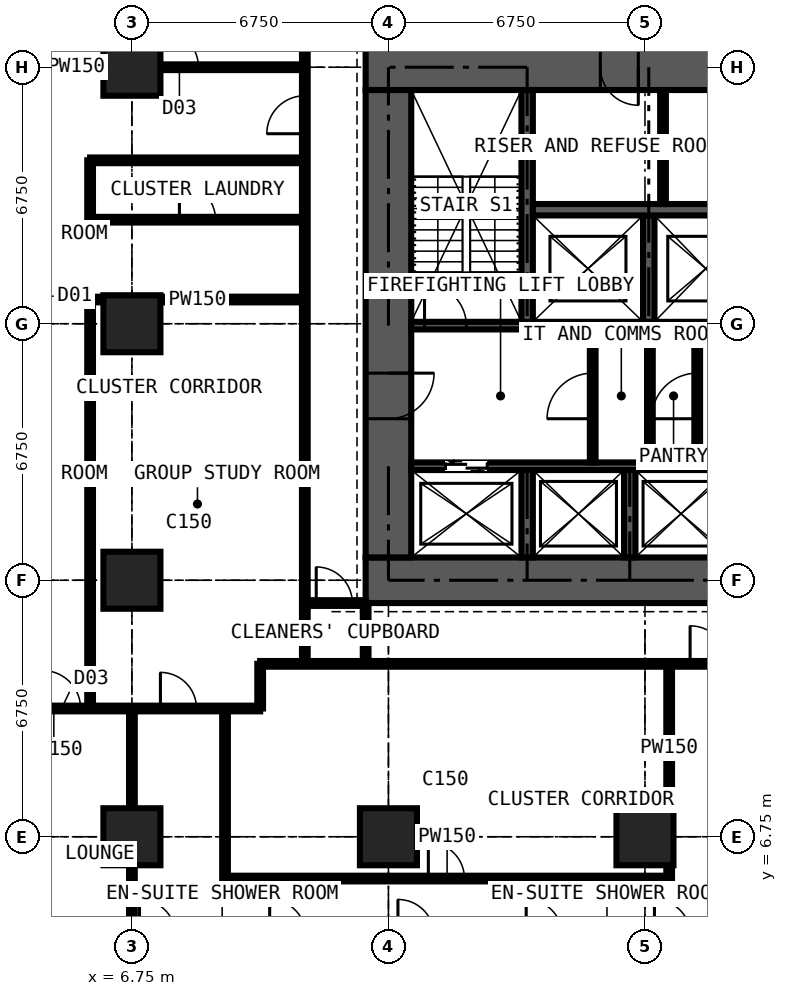
"""IFC4 building model, lengths in metres.
Left out: names, types, materials, properties, quantities, classifications, styles, units other than length and angle.
Written with IfcOpenShell. Run it as: python <this file> out.ifc"""

import sys

from ifc_helpers import new_model, si_unit, direction, frame, frame_2d, origin, origin_2d, place, context, subcontext, project, spatial, rectangle, extrude, element, fill, save


model = new_model("IFC4")
c1 = context("Model", 3, precision=1e-05, world=origin(), true_north=direction((0.0, 1.0)))
c2 = subcontext(c1, "Body", "Model", "MODEL_VIEW")
j1 = project(units=[si_unit("LENGTHUNIT", "METRE"), si_unit("PLANEANGLEUNIT", "RADIAN")], contexts=[c1])
p1 = place(None, origin())
s1 = spatial("IfcSite", under=j1, at=p1, CompositionType="ELEMENT")
p2 = place(p1, origin())
s2 = spatial("IfcBuilding", under=s1, at=p2, CompositionType="ELEMENT")
p3 = place(p2, frame((0.0, 0.0, 108.9)))
s3 = spatial("IfcBuildingStorey", under=s2, at=p3, CompositionType="ELEMENT", Elevation=108.9)
for number, where, z_axis, x_axis in (
    (1, (6.75, 6.75, 0.0), (0.0, 0.0, 1.0), (1.0, 0.0, 0.0)),
    (2, (6.75, 13.5, 0.0), (0.0, 0.0, 1.0), (1.0, 0.0, 0.0)),
    (3, (6.75, 20.25, 0.0), (0.0, 0.0, 1.0), (1.0, 0.0, 0.0)),
    (4, (6.75, 27.0, 0.0), (0.0, 0.0, 1.0), (1.0, 0.0, 0.0)),
    (5, (13.5, 6.75, 0.0), (0.0, 0.0, 1.0), (1.0, 0.0, 0.0)),
    (6, (20.25, 6.75, 0.0), (0.0, 0.0, 1.0), (1.0, 0.0, 0.0)),
):
    element("IfcColumn", number, at=place(p3, frame(where, z_axis=z_axis, x_axis=x_axis)), inside=s3, PredefinedType="COLUMN", context=c2, shape_type="SweptSolid", body=[
        extrude(rectangle(XDim=1.5, YDim=1.5, at=origin_2d()), origin(), (0.0, 0.0, 1.0), 3.6),
    ])
p4 = place(p3, frame((12.9, 13.5, 0.0), z_axis=(0.0, 0.0, 1.0), x_axis=(1.0, 0.0, 0.0)))
e7 = element("IfcWall", 7, at=p4, inside=s3, PredefinedType="SHEAR", context=c2, shape_type="SweptSolid", body=[
    extrude(rectangle(XDim=14.7, YDim=1.2, at=frame_2d((7.35, 0.0))), origin(), (0.0, 0.0, 1.0), 3.6),
])
p5 = place(p3, frame((27.6, 27.0, 0.0), z_axis=(0.0, 0.0, 1.0), x_axis=(-1.0, 0.0, 0.0)))
e8 = element("IfcWall", 8, at=p5, inside=s3, PredefinedType="SHEAR", context=c2, shape_type="SweptSolid", body=[
    extrude(rectangle(XDim=14.7, YDim=1.2, at=frame_2d((7.35, 0.0))), origin(), (0.0, 0.0, 1.0), 3.6),
])
p6 = place(p5, frame((4.55, 0.0, 0.0)))
e9 = element("IfcOpeningElement", 9, at=p6, cuts=e8, PredefinedType="OPENING", context=c2, shape_type="SweptSolid", body=[
    extrude(rectangle(XDim=0.9, YDim=2.2, at=frame_2d((0.45, 1.1))), frame((0.0, 0.61, 0.0), z_axis=(0.0, -1.0, 0.0), x_axis=(1.0, 0.0, 0.0)), (0.0, 0.0, 1.0), 1.22),
])
p7 = place(p5, frame((7.525, 0.0, 0.0)))
e10 = element("IfcOpeningElement", 10, at=p7, cuts=e8, PredefinedType="OPENING", context=c2, shape_type="SweptSolid", body=[
    extrude(rectangle(XDim=1.0, YDim=2.2, at=frame_2d((0.5, 1.1))), frame((0.0, 0.61, 0.0), z_axis=(0.0, -1.0, 0.0), x_axis=(1.0, 0.0, 0.0)), (0.0, 0.0, 1.0), 1.22),
])
p8 = place(p3, frame((13.5, 26.4, 0.0), z_axis=(0.0, 0.0, 1.0), x_axis=(0.0, -1.0, 0.0)))
e11 = element("IfcWall", 11, at=p8, inside=s3, PredefinedType="SHEAR", context=c2, shape_type="SweptSolid", body=[
    extrude(rectangle(XDim=12.3, YDim=1.2, at=frame_2d((6.15, 0.0))), origin(), (0.0, 0.0, 1.0), 3.6),
])
p9 = place(p8, frame((7.45, 0.0, 0.0)))
e12 = element("IfcOpeningElement", 12, at=p9, cuts=e11, PredefinedType="OPENING", context=c2, shape_type="SweptSolid", body=[
    extrude(rectangle(XDim=1.2, YDim=2.2, at=frame_2d((0.6, 1.1))), frame((0.0, 0.61, 0.0), z_axis=(0.0, -1.0, 0.0), x_axis=(1.0, 0.0, 0.0)), (0.0, 0.0, 1.0), 1.22),
])
p10 = place(p3, frame((14.1, 16.5, 0.0), z_axis=(0.0, 0.0, 1.0), x_axis=(1.0, 0.0, 0.0)))
e13 = element("IfcWall", 13, at=p10, inside=s3, PredefinedType="SHEAR", context=c2, shape_type="SweptSolid", body=[
    extrude(rectangle(XDim=12.3, YDim=0.2, at=frame_2d((6.15, 0.0))), origin(), (0.0, 0.0, 1.0), 3.6),
])
p11 = place(p10, frame((0.9, 0.0, 0.0)))
e14 = element("IfcOpeningElement", 14, at=p11, cuts=e13, PredefinedType="OPENING", context=c2, shape_type="SweptSolid", body=[
    extrude(rectangle(XDim=1.1, YDim=2.2, at=frame_2d((0.55, 1.1))), frame((0.0, 0.11, 0.0), z_axis=(0.0, -1.0, 0.0), x_axis=(1.0, 0.0, 0.0)), (0.0, 0.0, 1.0), 0.22),
])
p12 = place(p10, frame((9.5, 0.0, 0.0)))
e15 = element("IfcOpeningElement", 15, at=p12, cuts=e13, PredefinedType="OPENING", context=c2, shape_type="SweptSolid", body=[
    extrude(rectangle(XDim=1.1, YDim=2.2, at=frame_2d((0.55, 1.1))), frame((0.0, 0.11, 0.0), z_axis=(0.0, -1.0, 0.0), x_axis=(1.0, 0.0, 0.0)), (0.0, 0.0, 1.0), 0.22),
])
p13 = place(p3, frame((14.1, 20.2, 0.0), z_axis=(0.0, 0.0, 1.0), x_axis=(1.0, 0.0, 0.0)))
e16 = element("IfcWall", 16, at=p13, inside=s3, PredefinedType="SHEAR", context=c2, shape_type="SweptSolid", body=[
    extrude(rectangle(XDim=12.3, YDim=0.2, at=frame_2d((6.15, 0.0))), origin(), (0.0, 0.0, 1.0), 3.6),
])
p14 = place(p13, frame((0.35, 0.0, 0.0)))
e17 = element("IfcOpeningElement", 17, at=p14, cuts=e16, PredefinedType="OPENING", context=c2, shape_type="SweptSolid", body=[
    extrude(rectangle(XDim=1.1, YDim=2.2, at=frame_2d((0.55, 1.1))), frame((0.0, 0.11, 0.0), z_axis=(0.0, -1.0, 0.0), x_axis=(1.0, 0.0, 0.0)), (0.0, 0.0, 1.0), 0.22),
])
p15 = place(p13, frame((9.75, 0.0, 0.0)))
e18 = element("IfcOpeningElement", 18, at=p15, cuts=e16, PredefinedType="OPENING", context=c2, shape_type="SweptSolid", body=[
    extrude(rectangle(XDim=1.1, YDim=2.2, at=frame_2d((0.55, 1.1))), frame((0.0, 0.11, 0.0), z_axis=(0.0, -1.0, 0.0), x_axis=(1.0, 0.0, 0.0)), (0.0, 0.0, 1.0), 0.22),
])
p16 = place(p3, frame((17.15, 20.3, 0.0), z_axis=(0.0, 0.0, 1.0), x_axis=(0.0, 1.0, 0.0)))
e19 = element("IfcWall", 19, at=p16, inside=s3, PredefinedType="SHEAR", context=c2, shape_type="SweptSolid", body=[
    extrude(rectangle(XDim=6.1, YDim=0.3, at=frame_2d((3.05, 0.0))), origin(), (0.0, 0.0, 1.0), 3.6),
])
p17 = place(p3, frame((20.35, 20.3, 0.0), z_axis=(0.0, 0.0, 1.0), x_axis=(0.0, 1.0, 0.0)))
e20 = element("IfcWall", 20, at=p17, inside=s3, PredefinedType="SHEAR", context=c2, shape_type="SweptSolid", body=[
    extrude(rectangle(XDim=2.8, YDim=0.3, at=frame_2d((1.4, 0.0))), origin(), (0.0, 0.0, 1.0), 3.6),
])
p18 = place(p3, frame((17.3, 23.25, 0.0), z_axis=(0.0, 0.0, 1.0), x_axis=(1.0, 0.0, 0.0)))
e21 = element("IfcWall", 21, at=p18, inside=s3, PredefinedType="SHEAR", context=c2, shape_type="SweptSolid", body=[
    extrude(rectangle(XDim=5.9, YDim=0.3, at=frame_2d((2.95, 0.0))), origin(), (0.0, 0.0, 1.0), 3.6),
])
for number, where, z_axis, x_axis in (
    (22, (17.15, 14.1, 0.0), (0.0, 0.0, 1.0), (0.0, 1.0, 0.0)),
    (23, (19.85, 14.1, 0.0), (0.0, 0.0, 1.0), (0.0, 1.0, 0.0)),
):
    element("IfcWall", number, at=place(p3, frame(where, z_axis=z_axis, x_axis=x_axis)), inside=s3, PredefinedType="SHEAR", context=c2, shape_type="SweptSolid", body=[
        extrude(rectangle(XDim=2.3, YDim=0.3, at=frame_2d((1.15, 0.0))), origin(), (0.0, 0.0, 1.0), 3.6),
    ])
p19 = place(p3, frame((18.875, 16.6, 0.0), z_axis=(0.0, 0.0, 1.0), x_axis=(0.0, 1.0, 0.0)))
e24 = element("IfcWall", 24, at=p19, inside=s3, PredefinedType="PARTITIONING", context=c2, shape_type="SweptSolid", body=[
    extrude(rectangle(XDim=3.5, YDim=0.15, at=frame_2d((1.75, 0.0))), origin(), (0.0, 0.0, 1.0), 3.375),
])
p20 = place(p19, frame((1.15, 0.0, 0.0)))
e25 = element("IfcOpeningElement", 25, at=p20, cuts=e24, PredefinedType="OPENING", context=c2, shape_type="SweptSolid", body=[
    extrude(rectangle(XDim=1.2, YDim=2.2, at=frame_2d((0.6, 1.1))), frame((0.0, 0.085, 0.0), z_axis=(0.0, -1.0, 0.0), x_axis=(1.0, 0.0, 0.0)), (0.0, 0.0, 1.0), 0.17),
])
p21 = place(p3, frame((21.625, 16.6, 0.0), z_axis=(0.0, 0.0, 1.0), x_axis=(0.0, 1.0, 0.0)))
e26 = element("IfcWall", 26, at=p21, inside=s3, PredefinedType="PARTITIONING", context=c2, shape_type="SweptSolid", body=[
    extrude(rectangle(XDim=3.5, YDim=0.15, at=frame_2d((1.75, 0.0))), origin(), (0.0, 0.0, 1.0), 3.375),
])
p22 = place(p21, frame((1.15, 0.0, 0.0)))
e27 = element("IfcOpeningElement", 27, at=p22, cuts=e26, PredefinedType="OPENING", context=c2, shape_type="SweptSolid", body=[
    extrude(rectangle(XDim=1.2, YDim=2.2, at=frame_2d((0.6, 1.1))), frame((0.0, 0.085, 0.0), z_axis=(0.0, -1.0, 0.0), x_axis=(1.0, 0.0, 0.0)), (0.0, 0.0, 1.0), 0.17),
])
p23 = place(p3, frame((20.38, 16.6, 0.0), z_axis=(0.0, 0.0, 1.0), x_axis=(0.0, 1.0, 0.0)))
e28 = element("IfcWall", 28, at=p23, inside=s3, PredefinedType="PARTITIONING", context=c2, shape_type="SweptSolid", body=[
    extrude(rectangle(XDim=3.5, YDim=0.15, at=frame_2d((1.75, 0.0))), origin(), (0.0, 0.0, 1.0), 3.375),
])
p24 = place(p3, frame((20.725, 23.4, 0.0), z_axis=(0.0, 0.0, 1.0), x_axis=(0.0, 1.0, 0.0)))
e29 = element("IfcWall", 29, at=p24, inside=s3, PredefinedType="PARTITIONING", context=c2, shape_type="SweptSolid", body=[
    extrude(rectangle(XDim=3.0, YDim=0.15, at=frame_2d((1.5, 0.0))), origin(), (0.0, 0.0, 1.0), 3.375),
])
p25 = place(p3, frame((-0.734, 10.125, 0.0), z_axis=(0.0, 0.0, 1.0), x_axis=(1.0, 0.0, 0.0)))
e30 = element("IfcWall", 30, at=p25, inside=s3, PredefinedType="PARTITIONING", context=c2, shape_type="SweptSolid", body=[
    extrude(rectangle(XDim=10.859, YDim=0.15, at=frame_2d((5.429, 0.0))), origin(), (0.0, 0.0, 1.0), 3.375),
])
p26 = place(p25, frame((5.134, 0.0, 0.0)))
e31 = element("IfcOpeningElement", 31, at=p26, cuts=e30, PredefinedType="OPENING", context=c2, shape_type="SweptSolid", body=[
    extrude(rectangle(XDim=1.0, YDim=2.2, at=frame_2d((0.5, 1.1))), frame((0.0, 0.085, 0.0), z_axis=(0.0, -1.0, 0.0), x_axis=(1.0, 0.0, 0.0)), (0.0, 0.0, 1.0), 0.17),
])
p27 = place(p25, frame((8.234, 0.0, 0.0)))
e32 = element("IfcOpeningElement", 32, at=p27, cuts=e30, PredefinedType="OPENING", context=c2, shape_type="SweptSolid", body=[
    extrude(rectangle(XDim=0.95, YDim=2.2, at=frame_2d((0.475, 1.1))), frame((0.0, 0.085, 0.0), z_axis=(0.0, -1.0, 0.0), x_axis=(1.0, 0.0, 0.0)), (0.0, 0.0, 1.0), 0.17),
])
p28 = place(p3, frame((-0.734, 27.0, 0.0), z_axis=(0.0, 0.0, 1.0), x_axis=(1.0, 0.0, 0.0)))
e33 = element("IfcWall", 33, at=p28, inside=s3, PredefinedType="PARTITIONING", context=c2, shape_type="SweptSolid", body=[
    extrude(rectangle(XDim=12.034, YDim=0.15, at=frame_2d((6.017, 0.0))), origin(), (0.0, 0.0, 1.0), 2.806),
])
p29 = place(p28, frame((8.234, 0.0, 0.0)))
e34 = element("IfcOpeningElement", 34, at=p29, cuts=e33, PredefinedType="OPENING", context=c2, shape_type="SweptSolid", body=[
    extrude(rectangle(XDim=1.0, YDim=2.2, at=frame_2d((0.5, 1.1))), frame((0.0, 0.085, 0.0), z_axis=(0.0, -1.0, 0.0), x_axis=(1.0, 0.0, 0.0)), (0.0, 0.0, 1.0), 0.17),
])
p30 = place(p3, frame((5.65, 10.125, 0.0), z_axis=(0.0, 0.0, 1.0), x_axis=(0.0, 1.0, 0.0)))
e35 = element("IfcWall", 35, at=p30, inside=s3, PredefinedType="PARTITIONING", context=c2, shape_type="SweptSolid", body=[
    extrude(rectangle(XDim=10.762, YDim=0.15, at=frame_2d((5.381, 0.0))), origin(), (0.0, 0.0, 1.0), 3.375),
])
p31 = place(p3, frame((5.65, 20.887, 0.0), z_axis=(0.0, 0.0, 1.0), x_axis=(1.0, 0.0, 0.0)))
e36 = element("IfcWall", 36, at=p31, inside=s3, PredefinedType="PARTITIONING", context=c2, shape_type="SweptSolid", body=[
    extrude(rectangle(XDim=5.65, YDim=0.15, at=frame_2d((2.825, 0.0))), origin(), (0.0, 0.0, 1.0), 3.375),
])
p32 = place(p3, frame((5.65, 22.988, 0.0), z_axis=(0.0, 0.0, 1.0), x_axis=(0.0, 1.0, 0.0)))
e37 = element("IfcWall", 37, at=p32, inside=s3, PredefinedType="PARTITIONING", context=c2, shape_type="SweptSolid", body=[
    extrude(rectangle(XDim=1.562, YDim=0.15, at=frame_2d((0.781, 0.0))), origin(), (0.0, 0.0, 1.0), 3.375),
])
p33 = place(p3, frame((5.65, 22.988, 0.0), z_axis=(0.0, 0.0, 1.0), x_axis=(1.0, 0.0, 0.0)))
e38 = element("IfcWall", 38, at=p33, inside=s3, PredefinedType="PARTITIONING", context=c2, shape_type="SweptSolid", body=[
    extrude(rectangle(XDim=5.65, YDim=0.15, at=frame_2d((2.825, 0.0))), origin(), (0.0, 0.0, 1.0), 3.375),
])
p34 = place(p33, frame((2.35, 0.0, 0.0)))
e39 = element("IfcOpeningElement", 39, at=p34, cuts=e38, PredefinedType="OPENING", context=c2, shape_type="SweptSolid", body=[
    extrude(rectangle(XDim=0.95, YDim=2.2, at=frame_2d((0.475, 1.1))), frame((0.0, 0.085, 0.0), z_axis=(0.0, -1.0, 0.0), x_axis=(1.0, 0.0, 0.0)), (0.0, 0.0, 1.0), 0.17),
])
p35 = place(p3, frame((5.65, 24.55, 0.0), z_axis=(0.0, 0.0, 1.0), x_axis=(1.0, 0.0, 0.0)))
e40 = element("IfcWall", 40, at=p35, inside=s3, PredefinedType="PARTITIONING", context=c2, shape_type="SweptSolid", body=[
    extrude(rectangle(XDim=5.65, YDim=0.15, at=frame_2d((2.825, 0.0))), origin(), (0.0, 0.0, 1.0), 3.375),
])
p36 = place(p3, frame((6.75, -0.734, 0.0), z_axis=(0.0, 0.0, 1.0), x_axis=(0.0, 1.0, 0.0)))
e41 = element("IfcWall", 41, at=p36, inside=s3, PredefinedType="PARTITIONING", context=c2, shape_type="SweptSolid", body=[
    extrude(rectangle(XDim=10.859, YDim=0.15, at=frame_2d((5.429, 0.0))), origin(), (0.0, 0.0, 1.0), 2.877),
])
p37 = place(p3, frame((9.2, 5.65, 0.0), z_axis=(0.0, 0.0, 1.0), x_axis=(0.0, 1.0, 0.0)))
e42 = element("IfcWall", 42, at=p37, inside=s3, PredefinedType="PARTITIONING", context=c2, shape_type="SweptSolid", body=[
    extrude(rectangle(XDim=4.475, YDim=0.15, at=frame_2d((2.238, 0.0))), origin(), (0.0, 0.0, 1.0), 3.375),
])
p38 = place(p3, frame((9.2, 5.65, 0.0), z_axis=(0.0, 0.0, 1.0), x_axis=(1.0, 0.0, 0.0)))
e43 = element("IfcWall", 43, at=p38, inside=s3, PredefinedType="PARTITIONING", context=c2, shape_type="SweptSolid", body=[
    extrude(rectangle(XDim=11.688, YDim=0.15, at=frame_2d((5.844, 0.0))), origin(), (0.0, 0.0, 1.0), 3.375),
])
p39 = place(p38, frame((5.35, 0.0, 0.0)))
e44 = element("IfcOpeningElement", 44, at=p39, cuts=e43, PredefinedType="OPENING", context=c2, shape_type="SweptSolid", body=[
    extrude(rectangle(XDim=0.95, YDim=2.2, at=frame_2d((0.475, 1.1))), frame((0.0, 0.085, 0.0), z_axis=(0.0, -1.0, 0.0), x_axis=(1.0, 0.0, 0.0)), (0.0, 0.0, 1.0), 0.17),
])
p40 = place(p3, frame((10.125, 10.125, 0.0), z_axis=(0.0, 0.0, 1.0), x_axis=(0.0, 1.0, 0.0)))
e45 = element("IfcWall", 45, at=p40, inside=s3, PredefinedType="PARTITIONING", context=c2, shape_type="SweptSolid", body=[
    extrude(rectangle(XDim=1.175, YDim=0.15, at=frame_2d((0.587, 0.0))), origin(), (0.0, 0.0, 1.0), 3.375),
])
p41 = place(p3, frame((10.125, 11.3, 0.0), z_axis=(0.0, 0.0, 1.0), x_axis=(1.0, 0.0, 0.0)))
e46 = element("IfcWall", 46, at=p41, inside=s3, PredefinedType="PARTITIONING", context=c2, shape_type="SweptSolid", body=[
    extrude(rectangle(XDim=20.675, YDim=0.15, at=frame_2d((10.337, 0.0))), origin(), (0.0, 0.0, 1.0), 3.375),
])
p42 = place(p41, frame((11.312, 0.0, 0.0)))
e47 = element("IfcOpeningElement", 47, at=p42, cuts=e46, PredefinedType="OPENING", context=c2, shape_type="SweptSolid", body=[
    extrude(rectangle(XDim=1.0, YDim=2.2, at=frame_2d((0.5, 1.1))), frame((0.0, 0.085, 0.0), z_axis=(0.0, -1.0, 0.0), x_axis=(1.0, 0.0, 0.0)), (0.0, 0.0, 1.0), 0.17),
])
p43 = place(p3, frame((11.3, 11.3, 0.0), z_axis=(0.0, 0.0, 1.0), x_axis=(0.0, 1.0, 0.0)))
e48 = element("IfcWall", 48, at=p43, inside=s3, PredefinedType="PARTITIONING", context=c2, shape_type="SweptSolid", body=[
    extrude(rectangle(XDim=19.075, YDim=0.15, at=frame_2d((9.538, 0.0))), origin(), (0.0, 0.0, 1.0), 3.375),
])
p44 = place(p43, frame((13.95, 0.0, 0.0)))
e49 = element("IfcOpeningElement", 49, at=p44, cuts=e48, PredefinedType="OPENING", context=c2, shape_type="SweptSolid", body=[
    extrude(rectangle(XDim=1.0, YDim=2.2, at=frame_2d((0.5, 1.1))), frame((0.0, 0.085, 0.0), z_axis=(0.0, -1.0, 0.0), x_axis=(1.0, 0.0, 0.0)), (0.0, 0.0, 1.0), 0.17),
])
p45 = place(p3, frame((11.3, 12.9, 0.0), z_axis=(0.0, 0.0, 1.0), x_axis=(1.0, 0.0, 0.0)))
e50 = element("IfcWall", 50, at=p45, inside=s3, PredefinedType="PARTITIONING", context=c2, shape_type="SweptSolid", body=[
    extrude(rectangle(XDim=1.6, YDim=0.15, at=frame_2d((0.8, 0.0))), origin(), (0.0, 0.0, 1.0), 2.806),
])
p46 = place(p45, frame((0.3, 0.0, 0.0)))
e51 = element("IfcOpeningElement", 51, at=p46, cuts=e50, PredefinedType="OPENING", context=c2, shape_type="SweptSolid", body=[
    extrude(rectangle(XDim=0.95, YDim=2.2, at=frame_2d((0.475, 1.1))), frame((0.0, 0.085, 0.0), z_axis=(0.0, -1.0, 0.0), x_axis=(1.0, 0.0, 0.0)), (0.0, 0.0, 1.0), 0.17),
])
p47 = place(p3, frame((12.9, 11.3, 0.0), z_axis=(0.0, 0.0, 1.0), x_axis=(0.0, 1.0, 0.0)))
e52 = element("IfcWall", 52, at=p47, inside=s3, PredefinedType="PARTITIONING", context=c2, shape_type="SweptSolid", body=[
    extrude(rectangle(XDim=1.6, YDim=0.15, at=frame_2d((0.8, 0.0))), origin(), (0.0, 0.0, 1.0), 3.375),
])
p48 = place(p3, frame((20.887, 5.65, 0.0), z_axis=(0.0, 0.0, 1.0), x_axis=(0.0, 1.0, 0.0)))
e53 = element("IfcWall", 53, at=p48, inside=s3, PredefinedType="PARTITIONING", context=c2, shape_type="SweptSolid", body=[
    extrude(rectangle(XDim=5.65, YDim=0.15, at=frame_2d((2.825, 0.0))), origin(), (0.0, 0.0, 1.0), 3.375),
])
p49 = place(p11, origin())
e54 = element("IfcDoor", 54, at=p49, inside=s3, OperationType="DOUBLE_DOOR_SLIDING", PredefinedType="DOOR", context=c2, shape_type="SweptSolid", body=[
    extrude(rectangle(XDim=1.1, YDim=2.2, at=frame_2d((0.55, 1.1))), frame((0.0, 0.025, 0.0), z_axis=(0.0, -1.0, 0.0), x_axis=(1.0, 0.0, 0.0)), (0.0, 0.0, 1.0), 0.05),
])
fill(e14, e54)
p50 = place(p9, origin())
e55 = element("IfcDoor", 55, at=p50, inside=s3, OperationType="DOUBLE_DOOR_SINGLE_SWING", PredefinedType="DOOR", context=c2, shape_type="SweptSolid", body=[
    extrude(rectangle(XDim=1.2, YDim=2.2, at=frame_2d((0.6, 1.1))), frame((0.0, 0.025, 0.0), z_axis=(0.0, -1.0, 0.0), x_axis=(1.0, 0.0, 0.0)), (0.0, 0.0, 1.0), 0.05),
])
fill(e12, e55)
p51 = place(p20, origin())
e56 = element("IfcDoor", 56, at=p51, inside=s3, OperationType="DOUBLE_DOOR_SINGLE_SWING", PredefinedType="DOOR", context=c2, shape_type="SweptSolid", body=[
    extrude(rectangle(XDim=1.2, YDim=2.2, at=frame_2d((0.6, 1.1))), frame((0.0, 0.025, 0.0), z_axis=(0.0, -1.0, 0.0), x_axis=(1.0, 0.0, 0.0)), (0.0, 0.0, 1.0), 0.05),
])
fill(e25, e56)
p52 = place(p22, origin())
e57 = element("IfcDoor", 57, at=p52, inside=s3, OperationType="DOUBLE_DOOR_SINGLE_SWING", PredefinedType="DOOR", context=c2, shape_type="SweptSolid", body=[
    extrude(rectangle(XDim=1.2, YDim=2.2, at=frame_2d((0.6, 1.1))), frame((0.0, 0.025, 0.0), z_axis=(0.0, -1.0, 0.0), x_axis=(1.0, 0.0, 0.0)), (0.0, 0.0, 1.0), 0.05),
])
fill(e27, e57)
p53 = place(p7, origin())
e58 = element("IfcDoor", 58, at=p53, inside=s3, OperationType="SINGLE_SWING_LEFT", PredefinedType="DOOR", context=c2, shape_type="SweptSolid", body=[
    extrude(rectangle(XDim=1.0, YDim=2.2, at=frame_2d((0.5, 1.1))), frame((0.0, 0.025, 0.0), z_axis=(0.0, -1.0, 0.0), x_axis=(1.0, 0.0, 0.0)), (0.0, 0.0, 1.0), 0.05),
])
fill(e10, e58)
p54 = place(p14, origin())
e59 = element("IfcDoor", 59, at=p54, inside=s3, OperationType="SINGLE_SWING_LEFT", PredefinedType="DOOR", context=c2, shape_type="SweptSolid", body=[
    extrude(rectangle(XDim=1.1, YDim=2.2, at=frame_2d((0.55, 1.1))), frame((0.0, 0.025, 0.0), z_axis=(0.0, -1.0, 0.0), x_axis=(1.0, 0.0, 0.0)), (0.0, 0.0, 1.0), 0.05),
])
fill(e17, e59)
p55 = place(p46, origin())
e60 = element("IfcDoor", 60, at=p55, inside=s3, OperationType="SINGLE_SWING_LEFT", PredefinedType="DOOR", context=c2, shape_type="SweptSolid", body=[
    extrude(rectangle(XDim=0.95, YDim=2.2, at=frame_2d((0.475, 1.1))), frame((0.0, 0.025, 0.0), z_axis=(0.0, -1.0, 0.0), x_axis=(1.0, 0.0, 0.0)), (0.0, 0.0, 1.0), 0.05),
])
fill(e51, e60)
p56 = place(p26, origin())
e61 = element("IfcDoor", 61, at=p56, inside=s3, OperationType="SINGLE_SWING_LEFT", PredefinedType="DOOR", context=c2, shape_type="SweptSolid", body=[
    extrude(rectangle(XDim=1.0, YDim=2.2, at=frame_2d((0.5, 1.1))), frame((0.0, 0.025, 0.0), z_axis=(0.0, -1.0, 0.0), x_axis=(1.0, 0.0, 0.0)), (0.0, 0.0, 1.0), 0.05),
])
fill(e31, e61)
p57 = place(p42, origin())
e62 = element("IfcDoor", 62, at=p57, inside=s3, OperationType="SINGLE_SWING_LEFT", PredefinedType="DOOR", context=c2, shape_type="SweptSolid", body=[
    extrude(rectangle(XDim=1.0, YDim=2.2, at=frame_2d((0.5, 1.1))), frame((0.0, 0.025, 0.0), z_axis=(0.0, -1.0, 0.0), x_axis=(1.0, 0.0, 0.0)), (0.0, 0.0, 1.0), 0.05),
])
fill(e47, e62)
p58 = place(p39, origin())
e63 = element("IfcDoor", 63, at=p58, inside=s3, OperationType="SINGLE_SWING_LEFT", PredefinedType="DOOR", context=c2, shape_type="SweptSolid", body=[
    extrude(rectangle(XDim=0.95, YDim=2.2, at=frame_2d((0.475, 1.1))), frame((0.0, 0.025, 0.0), z_axis=(0.0, -1.0, 0.0), x_axis=(1.0, 0.0, 0.0)), (0.0, 0.0, 1.0), 0.05),
])
fill(e44, e63)
p59 = place(p29, origin())
e64 = element("IfcDoor", 64, at=p59, inside=s3, OperationType="SINGLE_SWING_LEFT", PredefinedType="DOOR", context=c2, shape_type="SweptSolid", body=[
    extrude(rectangle(XDim=1.0, YDim=2.2, at=frame_2d((0.5, 1.1))), frame((0.0, 0.025, 0.0), z_axis=(0.0, -1.0, 0.0), x_axis=(1.0, 0.0, 0.0)), (0.0, 0.0, 1.0), 0.05),
])
fill(e34, e64)
p60 = place(p44, origin())
e65 = element("IfcDoor", 65, at=p60, inside=s3, OperationType="SINGLE_SWING_LEFT", PredefinedType="DOOR", context=c2, shape_type="SweptSolid", body=[
    extrude(rectangle(XDim=1.0, YDim=2.2, at=frame_2d((0.5, 1.1))), frame((0.0, 0.025, 0.0), z_axis=(0.0, -1.0, 0.0), x_axis=(1.0, 0.0, 0.0)), (0.0, 0.0, 1.0), 0.05),
])
fill(e49, e65)
p61 = place(p34, origin())
e66 = element("IfcDoor", 66, at=p61, inside=s3, OperationType="SINGLE_SWING_LEFT", PredefinedType="DOOR", context=c2, shape_type="SweptSolid", body=[
    extrude(rectangle(XDim=0.95, YDim=2.2, at=frame_2d((0.475, 1.1))), frame((0.0, 0.025, 0.0), z_axis=(0.0, -1.0, 0.0), x_axis=(1.0, 0.0, 0.0)), (0.0, 0.0, 1.0), 0.05),
])
fill(e39, e66)
p62 = place(p27, origin())
e67 = element("IfcDoor", 67, at=p62, inside=s3, OperationType="SINGLE_SWING_LEFT", PredefinedType="DOOR", context=c2, shape_type="SweptSolid", body=[
    extrude(rectangle(XDim=0.95, YDim=2.2, at=frame_2d((0.475, 1.1))), frame((0.0, 0.025, 0.0), z_axis=(0.0, -1.0, 0.0), x_axis=(1.0, 0.0, 0.0)), (0.0, 0.0, 1.0), 0.05),
])
fill(e32, e67)
save(model, sys.argv[1])
